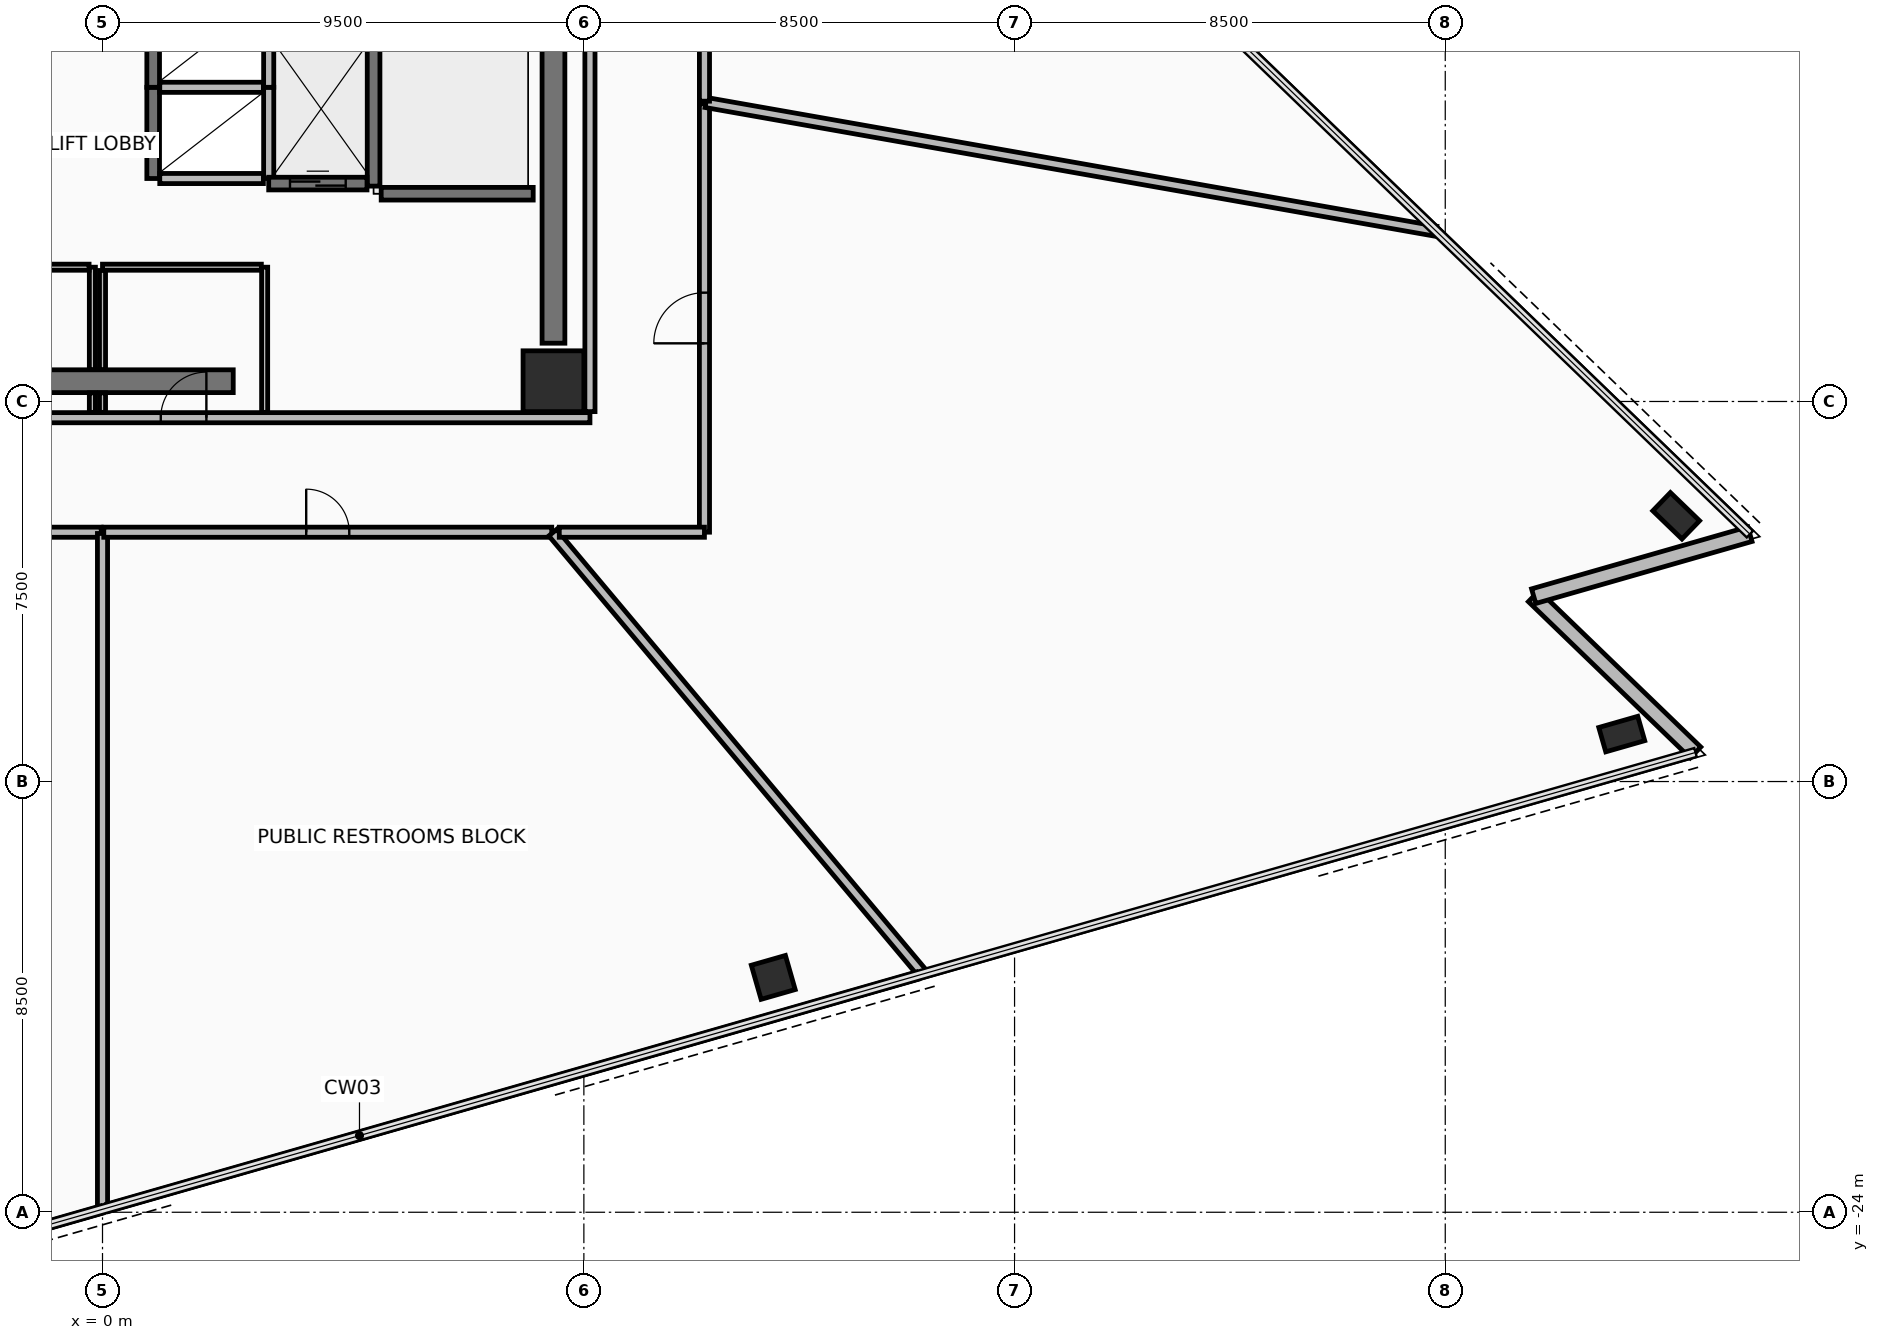
"""IFC4 building model, lengths in metres.
Left out: names, types, materials, properties, quantities, classifications, styles, units other than length and angle.
Written with IfcOpenShell. Run it as: python <this file> out.ifc"""

import sys

from ifc_helpers import new_model, si_unit, direction, frame, frame_2d, origin, origin_2d, place, context, subcontext, project, spatial, rectangle, hollow_rectangle, extrude, element, fill, save


model = new_model("IFC4")
c1 = context("Model", 3, precision=1e-05, world=origin(), true_north=direction((0.0, 1.0)))
c2 = subcontext(c1, "Body", "Model", "MODEL_VIEW")
j1 = project(units=[si_unit("LENGTHUNIT", "METRE"), si_unit("PLANEANGLEUNIT", "RADIAN")], contexts=[c1])
p1 = place(None, origin())
s1 = spatial("IfcSite", under=j1, at=p1, CompositionType="ELEMENT")
p2 = place(p1, origin())
s2 = spatial("IfcBuilding", under=s1, at=p2, CompositionType="ELEMENT")
p3 = place(p2, frame((0.0, 0.0, 89.7)))
s3 = spatial("IfcBuildingStorey", under=s2, at=p3, CompositionType="ELEMENT", Elevation=89.7)
p4 = place(p3, frame((8.9, -7.6, 0.0), z_axis=(0.0, 0.0, 1.0), x_axis=(1.0, 0.0, 0.0)))
e1 = element("IfcColumn", 1, at=p4, inside=s3, PredefinedType="COLUMN", context=c2, shape_type="SweptSolid", body=[
    extrude(rectangle(XDim=1.2, YDim=1.2, at=origin_2d()), origin(), (0.0, 0.0, 1.0), 3.6),
])
p5 = place(p3, frame((13.238, -19.365, 0.0), z_axis=(0.0, 0.0, 1.0), x_axis=(0.961261695938, 0.275637355817, 0.0)))
e2 = element("IfcColumn", 2, at=p5, inside=s3, PredefinedType="COLUMN", context=c2, shape_type="SweptSolid", body=[
    extrude(hollow_rectangle(XDim=0.7, YDim=0.7, WallThickness=0.04, at=origin_2d()), origin(), (0.0, 0.0, 1.0), 3.6),
])
for number, where, z_axis, x_axis in (
    (3, (29.983, -14.564, 0.0), (0.0, 0.0, 1.0), (0.961, 0.276, 0.0)),
    (4, (31.058, -10.256, 0.0), (0.0, 0.0, 1.0), (-0.719, 0.695, 0.0)),
):
    element("IfcColumn", number, at=place(p3, frame(where, z_axis=z_axis, x_axis=x_axis)), inside=s3, PredefinedType="COLUMN", context=c2, shape_type="SweptSolid", body=[
        extrude(hollow_rectangle(XDim=0.5, YDim=0.8, WallThickness=0.04, at=origin_2d()), origin(), (0.0, 0.0, 1.0), 3.6),
    ])
p6 = place(p3, frame((31.439, -14.927, 0.0), z_axis=(0.0, 0.0, 1.0), x_axis=(-0.719317126864, 0.694681848763, 0.0)))
e5 = element("IfcWall", 5, at=p6, inside=s3, PredefinedType="STANDARD", context=c2, shape_type="SweptSolid", body=[
    extrude(rectangle(XDim=4.44, YDim=0.3, at=frame_2d((2.22, 0.0))), origin(), (0.0, 0.0, 1.0), 2.605),
])
p7 = place(p3, frame((28.245, -11.842, 0.0), z_axis=(0.0, 0.0, 1.0), x_axis=(0.961255810825, 0.275657878821, 0.0)))
e6 = element("IfcWall", 6, at=p7, inside=s3, PredefinedType="STANDARD", context=c2, shape_type="SweptSolid", body=[
    extrude(rectangle(XDim=4.44, YDim=0.3, at=frame_2d((2.22, 0.0))), origin(), (0.0, 0.0, 1.0), 2.605),
])
p8 = place(p3, frame((-2.8, -7.6, 0.0), z_axis=(0.0, 0.0, 1.0), x_axis=(1.0, 0.0, 0.0)))
e7 = element("IfcWall", 7, at=p8, inside=s3, PredefinedType="SHEAR", context=c2, shape_type="SweptSolid", body=[
    extrude(rectangle(XDim=5.38, YDim=0.45, at=frame_2d((2.69, 0.0))), origin(), (0.0, 0.0, 1.0), 3.41),
])
p9 = place(p3, frame((8.9, -6.85, 0.0), z_axis=(0.0, 0.0, 1.0), x_axis=(0.0, 1.0, 0.0)))
e8 = element("IfcWall", 8, at=p9, inside=s3, PredefinedType="SHEAR", context=c2, shape_type="SweptSolid", body=[
    extrude(rectangle(XDim=10.7, YDim=0.45, at=frame_2d((5.35, 0.0))), origin(), (0.0, 0.0, 1.0), 3.41),
])
p10 = place(p3, frame((-9.62, -8.32, 0.0), z_axis=(0.0, 0.0, 1.0), x_axis=(1.0, 0.0, 0.0)))
e9 = element("IfcWall", 9, at=p10, inside=s3, PredefinedType="PARTITIONING", context=c2, shape_type="SweptSolid", body=[
    extrude(rectangle(XDim=19.24, YDim=0.2, at=frame_2d((9.62, 0.0))), origin(), (0.0, 0.0, 1.0), 2.805),
])
p11 = place(p10, frame((7.37, 0.0, 0.0)))
e10 = element("IfcOpeningElement", 10, at=p11, cuts=e9, PredefinedType="OPENING", context=c2, shape_type="SweptSolid", body=[
    extrude(rectangle(XDim=0.9, YDim=2.1, at=frame_2d((0.45, 1.05))), frame((0.0, 0.11, 0.0), z_axis=(0.0, -1.0, 0.0), x_axis=(1.0, 0.0, 0.0)), (0.0, 0.0, 1.0), 0.22),
])
p12 = place(p10, frame((10.77, 0.0, 0.0)))
e11 = element("IfcOpeningElement", 11, at=p12, cuts=e9, PredefinedType="OPENING", context=c2, shape_type="SweptSolid", body=[
    extrude(rectangle(XDim=0.9, YDim=2.1, at=frame_2d((0.45, 1.05))), frame((0.0, 0.11, 0.0), z_axis=(0.0, -1.0, 0.0), x_axis=(1.0, 0.0, 0.0)), (0.0, 0.0, 1.0), 0.22),
])
p13 = place(p3, frame((9.62, -8.2, 0.0), z_axis=(0.0, 0.0, 1.0), x_axis=(0.0, 1.0, 0.0)))
e12 = element("IfcWall", 12, at=p13, inside=s3, PredefinedType="PARTITIONING", context=c2, shape_type="SweptSolid", body=[
    extrude(rectangle(XDim=16.4, YDim=0.2, at=frame_2d((8.2, 0.0))), origin(), (0.0, 0.0, 1.0), 2.805),
])
p14 = place(p13, frame((12.65, 0.0, 0.0)))
e13 = element("IfcOpeningElement", 13, at=p14, cuts=e12, PredefinedType="OPENING", context=c2, shape_type="SweptSolid", body=[
    extrude(rectangle(XDim=1.1, YDim=2.15, at=frame_2d((0.55, 1.075))), frame((0.0, 0.11, 0.0), z_axis=(0.0, -1.0, 0.0), x_axis=(1.0, 0.0, 0.0)), (0.0, 0.0, 1.0), 0.22),
])
p15 = place(p3, frame((5.35, -3.75, 0.0), z_axis=(0.0, 0.0, 1.0), x_axis=(0.0, 1.0, 0.0)))
e14 = element("IfcWall", 14, at=p15, inside=s3, PredefinedType="SHEAR", context=c2, shape_type="SweptSolid", body=[
    extrude(rectangle(XDim=7.3, YDim=0.25, at=frame_2d((3.65, 0.0))), origin(), (0.0, 0.0, 1.0), 3.41),
])
p16 = place(p3, frame((5.5, -3.9, 0.0), z_axis=(0.0, 0.0, 1.0), x_axis=(1.0, 0.0, 0.0)))
e15 = element("IfcWall", 15, at=p16, inside=s3, PredefinedType="SHEAR", context=c2, shape_type="SweptSolid", body=[
    extrude(rectangle(XDim=3.0, YDim=0.25, at=frame_2d((1.5, 0.0))), origin(), (0.0, 0.0, 1.0), 3.41),
])
p17 = place(p3, frame((1.0, -3.6, 0.0), z_axis=(0.0, 0.0, 1.0), x_axis=(0.0, 1.0, 0.0)))
e16 = element("IfcWall", 16, at=p17, inside=s3, PredefinedType="SHEAR", context=c2, shape_type="SweptSolid", body=[
    extrude(rectangle(XDim=1.8, YDim=0.25, at=frame_2d((0.9, 0.0))), origin(), (0.0, 0.0, 1.0), 3.41),
])
p18 = place(p3, frame((3.28, -3.6, 0.0), z_axis=(0.0, 0.0, 1.0), x_axis=(0.0, 1.0, 0.0)))
e17 = element("IfcWall", 17, at=p18, inside=s3, PredefinedType="PARTITIONING", context=c2, shape_type="SweptSolid", body=[
    extrude(rectangle(XDim=1.8, YDim=0.2, at=frame_2d((0.9, 0.0))), origin(), (0.0, 0.0, 1.0), 3.41),
])
for number, where, z_axis, x_axis in (
    (18, (1.13, -3.6, 0.0), (0.0, 0.0, 1.0), (1.0, 0.0, 0.0)),
    (19, (1.13, -1.8, 0.0), (0.0, 0.0, 1.0), (1.0, 0.0, 0.0)),
):
    element("IfcWall", number, at=place(p3, frame(where, z_axis=z_axis, x_axis=x_axis)), inside=s3, PredefinedType="PARTITIONING", context=c2, shape_type="SweptSolid", body=[
        extrude(rectangle(XDim=2.045, YDim=0.2, at=frame_2d((1.022, 0.0))), origin(), (0.0, 0.0, 1.0), 3.41),
    ])
p19 = place(p3, frame((1.0, -1.8, 0.0), z_axis=(0.0, 0.0, 1.0), x_axis=(0.0, 1.0, 0.0)))
e20 = element("IfcWall", 20, at=p19, inside=s3, PredefinedType="SHEAR", context=c2, shape_type="SweptSolid", body=[
    extrude(rectangle(XDim=1.8, YDim=0.25, at=frame_2d((0.9, 0.0))), origin(), (0.0, 0.0, 1.0), 3.41),
])
p20 = place(p3, frame((3.28, -1.8, 0.0), z_axis=(0.0, 0.0, 1.0), x_axis=(0.0, 1.0, 0.0)))
e21 = element("IfcWall", 21, at=p20, inside=s3, PredefinedType="PARTITIONING", context=c2, shape_type="SweptSolid", body=[
    extrude(rectangle(XDim=1.8, YDim=0.2, at=frame_2d((0.9, 0.0))), origin(), (0.0, 0.0, 1.0), 3.41),
])
p21 = place(p3, frame((3.28, -3.7, 0.0), z_axis=(0.0, 0.0, 1.0), x_axis=(1.0, 0.0, 0.0)))
e22 = element("IfcWall", 22, at=p21, inside=s3, PredefinedType="SHEAR", context=c2, shape_type="SweptSolid", body=[
    extrude(rectangle(XDim=1.94, YDim=0.25, at=frame_2d((0.97, 0.0))), origin(), (0.0, 0.0, 1.0), 3.41),
])
p22 = place(p21, frame((0.42, 0.0, 0.0)))
e23 = element("IfcOpeningElement", 23, at=p22, cuts=e22, PredefinedType="OPENING", context=c2, shape_type="SweptSolid", body=[
    extrude(rectangle(XDim=1.1, YDim=2.2, at=frame_2d((0.55, 1.1))), frame((0.0, 0.135, 0.0), z_axis=(0.0, -1.0, 0.0), x_axis=(1.0, 0.0, 0.0)), (0.0, 0.0, 1.0), 0.27),
])
p23 = place(p3, frame((-0.2, -8.215, 0.0), z_axis=(0.0, 0.0, 1.0), x_axis=(0.0, 1.0, 0.0)))
e24 = element("IfcWall", 24, at=p23, inside=s3, PredefinedType="PARTITIONING", context=c2, shape_type="SweptSolid", body=[
    extrude(rectangle(XDim=0.385, YDim=0.12, at=frame_2d((0.192, 0.0))), origin(), (0.0, 0.0, 1.0), 2.605),
])
p24 = place(p3, frame((-0.2, -7.37, 0.0), z_axis=(0.0, 0.0, 1.0), x_axis=(0.0, 1.0, 0.0)))
e25 = element("IfcWall", 25, at=p24, inside=s3, PredefinedType="PARTITIONING", context=c2, shape_type="SweptSolid", body=[
    extrude(rectangle(XDim=2.02, YDim=0.12, at=frame_2d((1.01, 0.0))), origin(), (0.0, 0.0, 1.0), 2.605),
])
p25 = place(p3, frame((-0.265, -5.35, 0.0), z_axis=(0.0, 0.0, 1.0), x_axis=(-1.0, 0.0, 0.0)))
e26 = element("IfcWall", 26, at=p25, inside=s3, PredefinedType="PARTITIONING", context=c2, shape_type="SweptSolid", body=[
    extrude(rectangle(XDim=3.135, YDim=0.12, at=frame_2d((1.567, 0.0))), origin(), (0.0, 0.0, 1.0), 2.605),
])
p26 = place(p3, frame((3.2, -8.215, 0.0), z_axis=(0.0, 0.0, 1.0), x_axis=(0.0, 1.0, 0.0)))
e27 = element("IfcWall", 27, at=p26, inside=s3, PredefinedType="PARTITIONING", context=c2, shape_type="SweptSolid", body=[
    extrude(rectangle(XDim=2.865, YDim=0.12, at=frame_2d((1.433, 0.0))), origin(), (0.0, 0.0, 1.0), 2.605),
])
p27 = place(p3, frame((3.135, -5.35, 0.0), z_axis=(0.0, 0.0, 1.0), x_axis=(-1.0, 0.0, 0.0)))
e28 = element("IfcWall", 28, at=p27, inside=s3, PredefinedType="PARTITIONING", context=c2, shape_type="SweptSolid", body=[
    extrude(rectangle(XDim=3.135, YDim=0.12, at=frame_2d((1.567, 0.0))), origin(), (0.0, 0.0, 1.0), 3.41),
])
p28 = place(p3, frame((0.0, -5.415, 0.0), z_axis=(0.0, 0.0, 1.0), x_axis=(0.0, -1.0, 0.0)))
e29 = element("IfcWall", 29, at=p28, inside=s3, PredefinedType="PARTITIONING", context=c2, shape_type="SweptSolid", body=[
    extrude(rectangle(XDim=1.955, YDim=0.12, at=frame_2d((0.978, 0.0))), origin(), (0.0, 0.0, 1.0), 2.605),
])
p29 = place(p3, frame((0.0, -7.83, 0.0), z_axis=(0.0, 0.0, 1.0), x_axis=(0.0, -1.0, 0.0)))
e30 = element("IfcWall", 30, at=p29, inside=s3, PredefinedType="PARTITIONING", context=c2, shape_type="SweptSolid", body=[
    extrude(rectangle(XDim=0.385, YDim=0.12, at=frame_2d((0.192, 0.0))), origin(), (0.0, 0.0, 1.0), 2.605),
])
p30 = place(p3, frame((-8.866, -10.58, 0.0), z_axis=(0.0, 0.0, 1.0), x_axis=(1.0, 0.0, 0.0)))
e31 = element("IfcWall", 31, at=p30, inside=s3, PredefinedType="PARTITIONING", context=c2, shape_type="SweptSolid", body=[
    extrude(rectangle(XDim=8.841, YDim=0.2, at=frame_2d((4.42, 0.0))), origin(), (0.0, 0.0, 1.0), 2.805),
])
p31 = place(p30, frame((3.995, 0.0, 0.0)))
e32 = element("IfcOpeningElement", 32, at=p31, cuts=e31, PredefinedType="OPENING", context=c2, shape_type="SweptSolid", body=[
    extrude(rectangle(XDim=0.85, YDim=2.1, at=frame_2d((0.425, 1.05))), frame((0.0, 0.11, 0.0), z_axis=(0.0, -1.0, 0.0), x_axis=(1.0, 0.0, 0.0)), (0.0, 0.0, 1.0), 0.22),
])
p32 = place(p3, frame((0.0, -10.605, 0.0), z_axis=(0.0, 0.0, 1.0), x_axis=(0.0, -1.0, 0.0)))
e33 = element("IfcWall", 33, at=p32, inside=s3, PredefinedType="PARTITIONING", context=c2, shape_type="SweptSolid", body=[
    extrude(rectangle(XDim=13.318, YDim=0.2, at=frame_2d((6.659, 0.0))), origin(), (0.0, 0.0, 1.0), 2.605),
])
p33 = place(p3, frame((-0.018, -23.947, 0.0), z_axis=(0.0, 0.0, 1.0), x_axis=(-0.961260414639, -0.2756418242, 0.0)))
e34 = element("IfcWall", 34, at=p33, inside=s3, PredefinedType="PARTITIONING", context=c2, shape_type="SweptSolid", body=[
    extrude(rectangle(XDim=21.956, YDim=0.15, at=frame_2d((10.978, 0.0))), origin(), (0.0, 0.0, 1.0), 3.41),
])
p34 = place(p3, frame((0.025, -10.58, 0.0), z_axis=(0.0, 0.0, 1.0), x_axis=(1.0, 0.0, 0.0)))
e35 = element("IfcWall", 35, at=p34, inside=s3, PredefinedType="PARTITIONING", context=c2, shape_type="SweptSolid", body=[
    extrude(rectangle(XDim=8.841, YDim=0.2, at=frame_2d((4.42, 0.0))), origin(), (0.0, 0.0, 1.0), 3.41),
])
p35 = place(p34, frame((3.995, 0.0, 0.0)))
e36 = element("IfcOpeningElement", 36, at=p35, cuts=e35, PredefinedType="OPENING", context=c2, shape_type="SweptSolid", body=[
    extrude(rectangle(XDim=0.85, YDim=2.1, at=frame_2d((0.425, 1.05))), frame((0.0, 0.11, 0.0), z_axis=(0.0, -1.0, 0.0), x_axis=(1.0, 0.0, 0.0)), (0.0, 0.0, 1.0), 0.22),
])
p36 = place(p3, frame((8.885, -10.589, 0.0), z_axis=(0.0, 0.0, 1.0), x_axis=(0.642785074973, -0.766046569989, 0.0)))
e37 = element("IfcWall", 37, at=p36, inside=s3, PredefinedType="PARTITIONING", context=c2, shape_type="SweptSolid", body=[
    extrude(rectangle(XDim=11.369, YDim=0.2, at=frame_2d((5.685, 0.0))), origin(), (0.0, 0.0, 1.0), 2.605),
])
p37 = place(p3, frame((16.083, -19.33, 0.0), z_axis=(0.0, 0.0, 1.0), x_axis=(-0.961261897418, -0.275636653174, 0.0)))
e38 = element("IfcWall", 38, at=p37, inside=s3, PredefinedType="PARTITIONING", context=c2, shape_type="SweptSolid", body=[
    extrude(rectangle(XDim=16.622, YDim=0.15, at=frame_2d((8.311, 0.0))), origin(), (0.0, 0.0, 1.0), 3.41),
])
p38 = place(p3, frame((11.88, -10.579, 0.0), z_axis=(0.0, 0.0, 1.0), x_axis=(0.0, 1.0, 0.0)))
e39 = element("IfcWall", 39, at=p38, inside=s3, PredefinedType="PARTITIONING", context=c2, shape_type="SweptSolid", body=[
    extrude(rectangle(XDim=8.455, YDim=0.2, at=frame_2d((4.228, 0.0))), origin(), (0.0, 0.0, 1.0), 2.805),
])
p39 = place(p38, frame((3.727, 0.0, 0.0)))
e40 = element("IfcOpeningElement", 40, at=p39, cuts=e39, PredefinedType="OPENING", context=c2, shape_type="SweptSolid", body=[
    extrude(rectangle(XDim=1.0, YDim=2.15, at=frame_2d((0.5, 1.075))), frame((0.0, 0.11, 0.0), z_axis=(0.0, -1.0, 0.0), x_axis=(1.0, 0.0, 0.0)), (0.0, 0.0, 1.0), 0.22),
])
p40 = place(p3, frame((11.909, -2.1, 0.0), z_axis=(0.0, 0.0, 1.0), x_axis=(0.984806062871, -0.173657762662, 0.0)))
e41 = element("IfcWall", 41, at=p40, inside=s3, PredefinedType="PARTITIONING", context=c2, shape_type="SweptSolid", body=[
    extrude(rectangle(XDim=14.629, YDim=0.2, at=frame_2d((7.315, 0.0))), origin(), (0.0, 0.0, 1.0), 2.605),
])
p41 = place(p3, frame((9.015, -10.58, 0.0), z_axis=(0.0, 0.0, 1.0), x_axis=(1.0, 0.0, 0.0)))
e42 = element("IfcWall", 42, at=p41, inside=s3, PredefinedType="PARTITIONING", context=c2, shape_type="SweptSolid", body=[
    extrude(rectangle(XDim=2.865, YDim=0.2, at=frame_2d((1.432, 0.0))), origin(), (0.0, 0.0, 1.0), 2.805),
])
p42 = place(p3, frame((11.88, -2.074, 0.0), z_axis=(0.0, 0.0, 1.0), x_axis=(0.0, 1.0, 0.0)))
e43 = element("IfcWall", 43, at=p42, inside=s3, PredefinedType="PARTITIONING", context=c2, shape_type="SweptSolid", body=[
    extrude(rectangle(XDim=8.918, YDim=0.2, at=frame_2d((4.459, 0.0))), origin(), (0.0, 0.0, 1.0), 2.805),
])
p43 = place(p42, frame((4.009, 0.0, 0.0)))
e44 = element("IfcOpeningElement", 44, at=p43, cuts=e43, PredefinedType="OPENING", context=c2, shape_type="SweptSolid", body=[
    extrude(rectangle(XDim=0.9, YDim=2.1, at=frame_2d((0.45, 1.05))), frame((0.0, 0.11, 0.0), z_axis=(0.0, -1.0, 0.0), x_axis=(1.0, 0.0, 0.0)), (0.0, 0.0, 1.0), 0.22),
])
p44 = place(p22, origin())
e45 = element("IfcDoor", 45, at=p44, inside=s3, OperationType="SLIDING_TO_LEFT", PredefinedType="DOOR", context=c2, shape_type="SweptSolid", body=[
    extrude(rectangle(XDim=1.1, YDim=2.2, at=frame_2d((0.55, 1.1))), frame((0.0, 0.025, 0.0), z_axis=(0.0, -1.0, 0.0), x_axis=(1.0, 0.0, 0.0)), (0.0, 0.0, 1.0), 0.05),
])
fill(e23, e45)
p45 = place(p12, frame((0.9, 0.0, 0.0), z_axis=(0.0, 0.0, 1.0), x_axis=(-1.0, 0.0, 0.0)))
e46 = element("IfcDoor", 46, at=p45, inside=s3, OperationType="SINGLE_SWING_LEFT", PredefinedType="DOOR", context=c2, shape_type="SweptSolid", body=[
    extrude(rectangle(XDim=0.9, YDim=2.1, at=frame_2d((0.45, 1.05))), frame((0.0, 0.025, 0.0), z_axis=(0.0, -1.0, 0.0), x_axis=(1.0, 0.0, 0.0)), (0.0, 0.0, 1.0), 0.05),
])
fill(e11, e46)
p46 = place(p35, origin())
e47 = element("IfcDoor", 47, at=p46, inside=s3, OperationType="SINGLE_SWING_RIGHT", PredefinedType="DOOR", context=c2, shape_type="SweptSolid", body=[
    extrude(rectangle(XDim=0.85, YDim=2.1, at=frame_2d((0.425, 1.05))), frame((0.0, 0.025, 0.0), z_axis=(0.0, -1.0, 0.0), x_axis=(1.0, 0.0, 0.0)), (0.0, 0.0, 1.0), 0.05),
])
fill(e36, e47)
p47 = place(p39, origin())
e48 = element("IfcDoor", 48, at=p47, inside=s3, OperationType="SINGLE_SWING_RIGHT", PredefinedType="DOOR", context=c2, shape_type="SweptSolid", body=[
    extrude(rectangle(XDim=1.0, YDim=2.15, at=frame_2d((0.5, 1.075))), frame((0.0, 0.025, 0.0), z_axis=(0.0, -1.0, 0.0), x_axis=(1.0, 0.0, 0.0)), (0.0, 0.0, 1.0), 0.05),
])
fill(e40, e48)
save(model, sys.argv[1])
